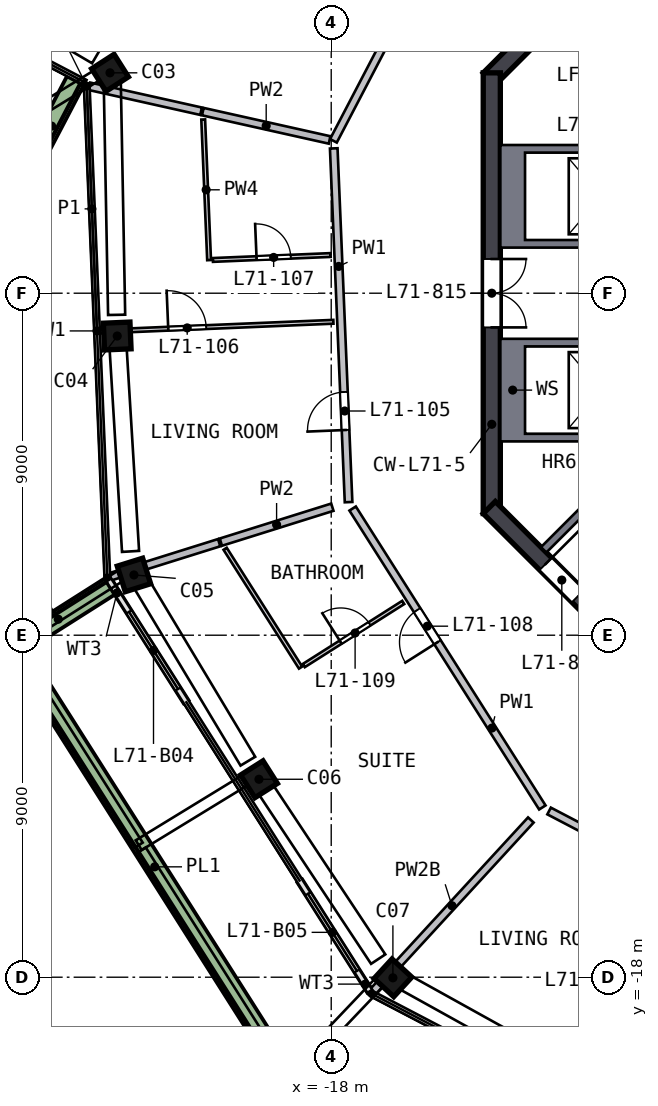
"""IFC4 building model, lengths in metres.
Left out: names, types, materials, properties, quantities, classifications, styles, units other than length and angle.
Written with IfcOpenShell. Run it as: python <this file> out.ifc"""

import sys

from ifc_helpers import new_model, si_unit, direction, frame, frame_2d, origin, origin_2d, place, context, subcontext, project, spatial, polyline, rectangle, outline, extrude, element, fill, save


model = new_model("IFC4")
c1 = context("Model", 3, precision=1e-05, world=origin(), true_north=direction((0.0, 1.0)))
c2 = subcontext(c1, "Body", "Model", "MODEL_VIEW")
j1 = project(units=[si_unit("LENGTHUNIT", "METRE"), si_unit("PLANEANGLEUNIT", "RADIAN")], contexts=[c1])
p1 = place(None, origin())
s1 = spatial("IfcSite", under=j1, at=p1, CompositionType="ELEMENT")
p2 = place(p1, origin())
s2 = spatial("IfcBuilding", under=s1, at=p2, CompositionType="ELEMENT")
p3 = place(p2, frame((0.0, 0.0, 288.0)))
s3 = spatial("IfcBuildingStorey", under=s2, at=p3, CompositionType="ELEMENT", Elevation=288.0)
p4 = place(p3, frame((-23.788, 5.936, 0.0), z_axis=(-0.027288562, -0.113334945, 0.99318202), x_axis=(-0.539731703, 0.837951325, 0.0807915)))
e1 = element("IfcColumn", 1, at=p4, inside=s3, PredefinedType="COLUMN", context=c2, shape_type="SweptSolid", body=[
    extrude(rectangle(XDim=0.7, YDim=0.7, at=origin_2d()), origin(), (0.0, 0.0, 1.0), 3.212),
])
p5 = place(p3, frame((-23.638, -0.991, 0.0), z_axis=(0.005703621, -0.112399349, 0.993646746), x_axis=(0.041934524, -0.992761931, -0.112539968)))
e2 = element("IfcColumn", 2, at=p5, inside=s3, PredefinedType="COLUMN", context=c2, shape_type="SweptSolid", body=[
    extrude(rectangle(XDim=0.7, YDim=0.7, at=origin_2d()), origin(), (0.0, 0.0, 1.0), 3.21),
])
p6 = place(p3, frame((-23.234, -7.281, 0.0), z_axis=(0.035577075, -0.110228117, 0.993269366), x_axis=(-0.297052323, 0.947810585, 0.115823193)))
e3 = element("IfcColumn", 3, at=p6, inside=s3, PredefinedType="COLUMN", context=c2, shape_type="SweptSolid", body=[
    extrude(rectangle(XDim=0.7, YDim=0.7, at=origin_2d()), origin(), (0.0, 0.0, 1.0), 3.212),
])
p7 = place(p3, frame((-19.975, -12.677, 0.0), z_axis=(0.061066808, -0.094528073, 0.993647467), x_axis=(0.532086167, -0.839178467, -0.112533601)))
e4 = element("IfcColumn", 4, at=p7, inside=s3, PredefinedType="COLUMN", context=c2, shape_type="SweptSolid", body=[
    extrude(rectangle(XDim=0.7, YDim=0.7, at=origin_2d()), origin(), (0.0, 0.0, 1.0), 3.21),
])
p8 = place(p3, frame((-16.481, -17.923, 0.0), z_axis=(0.085902454, -0.077616288, 0.993275632), x_axis=(-0.731317306, 0.672140187, 0.115769454)))
e5 = element("IfcColumn", 5, at=p8, inside=s3, PredefinedType="COLUMN", context=c2, shape_type="SweptSolid", body=[
    extrude(rectangle(XDim=0.7, YDim=0.7, at=origin_2d()), origin(), (0.0, 0.0, 1.0), 3.211),
])
p9 = place(p3, frame((-5.64, 13.841, 0.0), z_axis=(0.0, 0.0, 1.0), x_axis=(-0.707106781, -0.707106781, 0.0)))
e6 = element("IfcWall", 6, at=p9, inside=s3, PredefinedType="SHEAR", context=c2, shape_type="SweptSolid", body=[
    extrude(rectangle(XDim=11.598, YDim=0.45, at=frame_2d((5.799, 0.0))), origin(), (0.0, 0.0, 1.0), 3.5),
])
p10 = place(p3, frame((-13.775, 5.799, 0.0), z_axis=(0.0, 0.0, 1.0), x_axis=(0.0, -1.0, 0.0)))
e7 = element("IfcWall", 7, at=p10, inside=s3, PredefinedType="SHEAR", context=c2, shape_type="SweptSolid", body=[
    extrude(rectangle(XDim=11.598, YDim=0.45, at=frame_2d((5.799, 0.0))), origin(), (0.0, 0.0, 1.0), 3.5),
])
p11 = place(p10, frame((4.899, 0.0, 0.0)))
e8 = element("IfcOpeningElement", 8, at=p11, cuts=e7, PredefinedType="OPENING", context=c2, shape_type="SweptSolid", body=[
    extrude(rectangle(XDim=1.8, YDim=2.1, at=frame_2d((0.9, 1.05))), frame((0.0, 0.235, 0.0), z_axis=(0.0, -1.0, 0.0), x_axis=(1.0, 0.0, 0.0)), (0.0, 0.0, 1.0), 0.47),
])
p12 = place(p3, frame((-13.841, -5.64, 0.0), z_axis=(0.0, 0.0, 1.0), x_axis=(0.707106781, -0.707106781, 0.0)))
e9 = element("IfcWall", 9, at=p12, inside=s3, PredefinedType="SHEAR", context=c2, shape_type="SweptSolid", body=[
    extrude(rectangle(XDim=11.598, YDim=0.45, at=frame_2d((5.799, 0.0))), origin(), (0.0, 0.0, 1.0), 3.5),
])
p13 = place(p12, frame((2.099, 0.0, 0.0)))
e10 = element("IfcOpeningElement", 10, at=p13, cuts=e9, PredefinedType="OPENING", context=c2, shape_type="SweptSolid", body=[
    extrude(rectangle(XDim=1.2, YDim=2.1, at=frame_2d((0.6, 1.05))), frame((0.0, 0.235, 0.0), z_axis=(0.0, -1.0, 0.0), x_axis=(1.0, 0.0, 0.0)), (0.0, 0.0, 1.0), 0.47),
])
p14 = place(p3, frame((-23.848, -7.554, 0.0), z_axis=(0.0, 0.0, 1.0), x_axis=(0.535827975, -0.844327176, 0.0)))
e11 = element("IfcWall", 11, at=p14, inside=s3, PredefinedType="SOLIDWALL", context=c2, shape_type="SweptSolid", body=[
    extrude(rectangle(XDim=3.787, YDim=0.15, at=frame_2d((1.894, 0.0))), origin(), (0.0, 0.0, 1.0), 2.525),
])
p15 = place(p14, frame((0.987, 0.0, 0.0)))
e12 = element("IfcOpeningElement", 12, at=p15, cuts=e11, PredefinedType="OPENING", context=c2, shape_type="SweptSolid", body=[
    extrude(rectangle(XDim=2.4, YDim=2.4, at=frame_2d((1.2, 1.2))), frame((0.0, 0.085, 0.0), z_axis=(0.0, -1.0, 0.0), x_axis=(1.0, 0.0, 0.0)), (0.0, 0.0, 1.0), 0.17),
])
p16 = place(p3, frame((-18.826, -15.468, 0.0), z_axis=(0.0, 0.0, 1.0), x_axis=(0.53583323, -0.844323842, 0.0)))
e13 = element("IfcWall", 13, at=p16, inside=s3, PredefinedType="SOLIDWALL", context=c2, shape_type="SweptSolid", body=[
    extrude(rectangle(XDim=3.427, YDim=0.15, at=frame_2d((1.713, 0.0))), origin(), (0.0, 0.0, 1.0), 2.525),
])
p17 = place(p16, frame((0.4, 0.0, 0.0)))
e14 = element("IfcOpeningElement", 14, at=p17, cuts=e13, PredefinedType="OPENING", context=c2, shape_type="SweptSolid", body=[
    extrude(rectangle(XDim=2.4, YDim=2.4, at=frame_2d((1.2, 1.2))), frame((0.0, 0.085, 0.0), z_axis=(0.0, -1.0, 0.0), x_axis=(1.0, 0.0, 0.0)), (0.0, 0.0, 1.0), 0.17),
])
p18 = place(p3, frame((-25.982, 3.202, 0.0), z_axis=(0.0, 0.0, 1.0), x_axis=(0.463313949, 0.886194214, 0.0)))
e15 = element("IfcWall", 15, at=p18, inside=s3, PredefinedType="SOLIDWALL", context=c2, shape_type="SweptSolid", body=[
    extrude(rectangle(XDim=2.699, YDim=0.5, at=frame_2d((1.35, 0.0))), origin(), (0.0, 0.0, 1.0), 0.7),
])
p19 = place(p3, frame((-23.832, -7.722, 0.0), z_axis=(0.0, 0.0, 1.0), x_axis=(-0.844320788, -0.535838042, 0.0)))
e16 = element("IfcWall", 16, at=p19, inside=s3, PredefinedType="SOLIDWALL", context=c2, shape_type="SweptSolid", body=[
    extrude(rectangle(XDim=3.199, YDim=0.5, at=frame_2d((1.6, 0.0))), origin(), (0.0, 0.0, 1.0), 0.7),
])
p20 = place(p3, frame((-26.188, -9.513, 0.0), z_axis=(0.0, 0.0, 1.0), x_axis=(0.535821402, -0.844331348, 0.0)))
e17 = element("IfcWall", 17, at=p20, inside=s3, PredefinedType="SOLIDWALL", context=c2, shape_type="SweptSolid", body=[
    extrude(rectangle(XDim=13.224, YDim=0.5, at=frame_2d((6.612, 0.0))), origin(), (0.0, 0.0, 1.0), 0.7),
])
p21 = place(p3, origin())
e18 = element("IfcWall", 18, at=p21, inside=s3, PredefinedType="SOLIDWALL", context=c2, shape_type="SweptSolid", body=[
    extrude(outline(polyline([(-13.55, 3.9), (-9.9, 3.9), (-9.9, 3.7), (-12.9, 3.7), (-12.9, 1.4), (-9.9, 1.4), (-9.9, 1.2), (-13.55, 1.2), (-13.55, 3.9)])), origin(), (0.0, 0.0, 1.0), 3.19),
])
p22 = place(p3, origin())
e19 = element("IfcWall", 19, at=p22, inside=s3, PredefinedType="SOLIDWALL", context=c2, shape_type="SweptSolid", body=[
    extrude(outline(polyline([(-13.55, -3.9), (-13.55, -1.2), (-9.9, -1.2), (-9.9, -1.4), (-12.9, -1.4), (-12.9, -3.7), (-9.9, -3.7), (-9.9, -3.9), (-13.55, -3.9)])), origin(), (0.0, 0.0, 1.0), 3.19),
])
p23 = place(p3, origin())
e20 = element("IfcWall", 20, at=p23, inside=s3, PredefinedType="SOLIDWALL", context=c2, shape_type="SweptSolid", body=[
    extrude(outline(polyline([(-11.561, 7.601), (-9.652, 9.51), (-9.192, 9.051), (-10.96, 7.283), (-8.874, 5.197), (-9.016, 5.056), (-11.561, 7.601)])), origin(), (0.0, 0.0, 1.0), 3.19),
])
p24 = place(p3, frame((-9.334, -3.677, 0.0), z_axis=(0.0, 0.0, 1.0), x_axis=(-0.707106781, -0.707106781, 0.0)))
e21 = element("IfcWall", 21, at=p24, inside=s3, PredefinedType="SOLIDWALL", context=c2, shape_type="SweptSolid", body=[
    extrude(rectangle(XDim=4.35, YDim=0.2, at=frame_2d((2.175, 0.0))), origin(), (0.0, 0.0, 1.0), 3.19),
])
p25 = place(p3, frame((-17.543, -5.498, 0.0), z_axis=(0.0, 0.0, 1.0), x_axis=(-0.041874694, 0.99912287, 0.0)))
e22 = element("IfcWall", 22, at=p25, inside=s3, PredefinedType="SOLIDWALL", context=c2, shape_type="SweptSolid", body=[
    extrude(rectangle(XDim=9.317, YDim=0.2, at=frame_2d((4.658, 0.0))), origin(), (0.0, 0.0, 1.0), 3.19),
])
p26 = place(p25, frame((1.9, 0.0, 0.0)))
e23 = element("IfcOpeningElement", 23, at=p26, cuts=e22, PredefinedType="OPENING", context=c2, shape_type="SweptSolid", body=[
    extrude(rectangle(XDim=1.0, YDim=2.1, at=frame_2d((0.5, 1.05))), frame((0.0, 0.11, 0.0), z_axis=(0.0, -1.0, 0.0), x_axis=(1.0, 0.0, 0.0)), (0.0, 0.0, 1.0), 0.22),
])
p27 = place(p3, frame((-17.942, 4.01, 0.0), z_axis=(0.0, 0.0, 1.0), x_axis=(0.463289395, 0.88620705, 0.0)))
e24 = element("IfcWall", 24, at=p27, inside=s3, PredefinedType="SOLIDWALL", context=c2, shape_type="SweptSolid", body=[
    extrude(rectangle(XDim=9.537, YDim=0.2, at=frame_2d((4.768, 0.0))), origin(), (0.0, 0.0, 1.0), 3.19),
])
p28 = place(p27, frame((3.837, 0.0, 0.0)))
e25 = element("IfcOpeningElement", 25, at=p28, cuts=e24, PredefinedType="OPENING", context=c2, shape_type="SweptSolid", body=[
    extrude(rectangle(XDim=1.8, YDim=2.1, at=frame_2d((0.9, 1.05))), frame((0.0, 0.11, 0.0), z_axis=(0.0, -1.0, 0.0), x_axis=(1.0, 0.0, 0.0)), (0.0, 0.0, 1.0), 0.22),
])
p29 = place(p3, frame((-12.444, -13.533, 0.0), z_axis=(0.0, 0.0, 1.0), x_axis=(-0.535837373, 0.844321212, 0.0)))
e26 = element("IfcWall", 26, at=p29, inside=s3, PredefinedType="SOLIDWALL", context=c2, shape_type="SweptSolid", body=[
    extrude(rectangle(XDim=9.317, YDim=0.2, at=frame_2d((4.658, 0.0))), origin(), (0.0, 0.0, 1.0), 3.19),
])
p30 = place(p29, frame((5.15, 0.0, 0.0)))
e27 = element("IfcOpeningElement", 27, at=p30, cuts=e26, PredefinedType="OPENING", context=c2, shape_type="SweptSolid", body=[
    extrude(rectangle(XDim=1.0, YDim=2.1, at=frame_2d((0.5, 1.05))), frame((0.0, 0.11, 0.0), z_axis=(0.0, -1.0, 0.0), x_axis=(1.0, 0.0, 0.0)), (0.0, 0.0, 1.0), 0.22),
])
p31 = place(p3, frame((-4.188, -17.849, 0.0), z_axis=(0.0, 0.0, 1.0), x_axis=(-0.886199207, 0.463304399, 0.0)))
e28 = element("IfcWall", 28, at=p31, inside=s3, PredefinedType="SOLIDWALL", context=c2, shape_type="SweptSolid", body=[
    extrude(rectangle(XDim=9.117, YDim=0.2, at=frame_2d((4.559, 0.0))), origin(), (0.0, 0.0, 1.0), 3.19),
])
p32 = place(p31, frame((6.458, 0.0, 0.0)))
e29 = element("IfcOpeningElement", 29, at=p32, cuts=e28, PredefinedType="OPENING", context=c2, shape_type="SweptSolid", body=[
    extrude(rectangle(XDim=1.0, YDim=2.1, at=frame_2d((0.5, 1.05))), frame((0.0, 0.11, 0.0), z_axis=(0.0, -1.0, 0.0), x_axis=(1.0, 0.0, 0.0)), (0.0, 0.0, 1.0), 0.22),
])
p33 = place(p3, frame((-21.424, 4.789, 0.0), z_axis=(0.0, 0.0, 1.0), x_axis=(-0.975909655, 0.218175034, 0.0)))
e30 = element("IfcWall", 30, at=p33, inside=s3, PredefinedType="SOLIDWALL", context=c2, shape_type="SweptSolid", body=[
    extrude(rectangle(XDim=3.011, YDim=0.2, at=frame_2d((1.506, 0.0))), origin(), (0.0, 0.0, 1.0), 2.69),
])
p34 = place(p3, frame((-20.948, -6.565, 0.0), z_axis=(0.0, 0.0, 1.0), x_axis=(-0.954235882, -0.29905498, 0.0)))
e31 = element("IfcWall", 31, at=p34, inside=s3, PredefinedType="SOLIDWALL", context=c2, shape_type="SweptSolid", body=[
    extrude(rectangle(XDim=3.012, YDim=0.2, at=frame_2d((1.506, 0.0))), origin(), (0.0, 0.0, 1.0), 3.19),
])
p35 = place(p3, frame((-18.043, 4.033, 0.0), z_axis=(0.0, 0.0, 1.0), x_axis=(-0.975924202, 0.218109953, 0.0)))
e32 = element("IfcWall", 32, at=p35, inside=s3, PredefinedType="SOLIDWALL", context=c2, shape_type="SweptSolid", body=[
    extrude(rectangle(XDim=3.418, YDim=0.2, at=frame_2d((1.709, 0.0))), origin(), (0.0, 0.0, 1.0), 3.19),
])
p36 = place(p3, frame((-17.97, -5.632, 0.0), z_axis=(0.0, 0.0, 1.0), x_axis=(-0.954245152, -0.299025399, 0.0)))
e33 = element("IfcWall", 33, at=p36, inside=s3, PredefinedType="SOLIDWALL", context=c2, shape_type="SweptSolid", body=[
    extrude(rectangle(XDim=3.075, YDim=0.2, at=frame_2d((1.537, 0.0))), origin(), (0.0, 0.0, 1.0), 3.19),
])
p37 = place(p3, frame((-12.747, -13.862, 0.0), z_axis=(0.0, 0.0, 1.0), x_axis=(-0.676863295, -0.736108742, 0.0)))
e34 = element("IfcWall", 34, at=p37, inside=s3, PredefinedType="SOLIDWALL", context=c2, shape_type="SweptSolid", body=[
    extrude(rectangle(XDim=6.132, YDim=0.2, at=frame_2d((3.066, 0.0))), origin(), (0.0, 0.0, 1.0), 2.69),
])
p38 = place(p3, frame((-21.368, 4.572, 0.0), z_axis=(0.0, 0.0, 1.0), x_axis=(0.041855359, -0.99912368, 0.0)))
e35 = element("IfcWall", 35, at=p38, inside=s3, PredefinedType="PARTITIONING", context=c2, shape_type="SweptSolid", body=[
    extrude(rectangle(XDim=3.704, YDim=0.1, at=frame_2d((1.852, 0.0))), origin(), (0.0, 0.0, 1.0), 3.19),
])
p39 = place(p3, frame((-24.087, -1.01, 0.0), z_axis=(0.0, 0.0, 1.0), x_axis=(0.999122584, 0.041881529, 0.0)))
e36 = element("IfcWall", 36, at=p39, inside=s3, PredefinedType="PARTITIONING", context=c2, shape_type="SweptSolid", body=[
    extrude(rectangle(XDim=6.15, YDim=0.1, at=frame_2d((3.075, 0.0))), origin(), (0.0, 0.0, 1.0), 3.19),
])
p40 = place(p39, frame((1.8, 0.0, 0.0)))
e37 = element("IfcOpeningElement", 37, at=p40, cuts=e36, PredefinedType="OPENING", context=c2, shape_type="SweptSolid", body=[
    extrude(rectangle(XDim=1.0, YDim=2.1, at=frame_2d((0.5, 1.05))), frame((0.0, 0.06, 0.0), z_axis=(0.0, -1.0, 0.0), x_axis=(1.0, 0.0, 0.0)), (0.0, 0.0, 1.0), 0.12),
])
p41 = place(p3, frame((-18.807, -9.853, 0.0), z_axis=(0.0, 0.0, 1.0), x_axis=(-0.535851547, 0.844312217, 0.0)))
e38 = element("IfcWall", 38, at=p41, inside=s3, PredefinedType="PARTITIONING", context=c2, shape_type="SweptSolid", body=[
    extrude(rectangle(XDim=3.704, YDim=0.1, at=frame_2d((1.852, 0.0))), origin(), (0.0, 0.0, 1.0), 3.19),
])
p42 = place(p3, frame((-21.114, 0.875, 0.0), z_axis=(0.0, 0.0, 1.0), x_axis=(0.999121983, 0.041895869, 0.0)))
e39 = element("IfcWall", 39, at=p42, inside=s3, PredefinedType="PARTITIONING", context=c2, shape_type="SweptSolid", body=[
    extrude(rectangle(XDim=3.1, YDim=0.1, at=frame_2d((1.55, 0.0))), origin(), (0.0, 0.0, 1.0), 3.19),
])
p43 = place(p42, frame((1.15, 0.0, 0.0)))
e40 = element("IfcOpeningElement", 40, at=p43, cuts=e39, PredefinedType="OPENING", context=c2, shape_type="SweptSolid", body=[
    extrude(rectangle(XDim=0.9, YDim=2.1, at=frame_2d((0.45, 1.05))), frame((0.0, 0.06, 0.0), z_axis=(0.0, -1.0, 0.0), x_axis=(1.0, 0.0, 0.0)), (0.0, 0.0, 1.0), 0.12),
])
p44 = place(p3, frame((-18.722, -9.799, 0.0), z_axis=(0.0, 0.0, 1.0), x_axis=(0.844319142, 0.535840635, 0.0)))
e41 = element("IfcWall", 41, at=p44, inside=s3, PredefinedType="PARTITIONING", context=c2, shape_type="SweptSolid", body=[
    extrude(rectangle(XDim=3.1, YDim=0.1, at=frame_2d((1.55, 0.0))), origin(), (0.0, 0.0, 1.0), 3.19),
])
p45 = place(p44, frame((1.15, 0.0, 0.0)))
e42 = element("IfcOpeningElement", 42, at=p45, cuts=e41, PredefinedType="OPENING", context=c2, shape_type="SweptSolid", body=[
    extrude(rectangle(XDim=0.9, YDim=2.1, at=frame_2d((0.45, 1.05))), frame((0.0, 0.06, 0.0), z_axis=(0.0, -1.0, 0.0), x_axis=(1.0, 0.0, 0.0)), (0.0, 0.0, 1.0), 0.12),
])
p46 = place(p15, origin())
e43 = element("IfcDoor", 43, at=p46, inside=s3, OperationType="SLIDING_TO_LEFT", PredefinedType="DOOR", context=c2, shape_type="SweptSolid", body=[
    extrude(rectangle(XDim=2.4, YDim=2.4, at=frame_2d((1.2, 1.2))), frame((0.0, 0.025, 0.0), z_axis=(0.0, -1.0, 0.0), x_axis=(1.0, 0.0, 0.0)), (0.0, 0.0, 1.0), 0.05),
])
fill(e12, e43)
p47 = place(p17, origin())
e44 = element("IfcDoor", 44, at=p47, inside=s3, OperationType="SLIDING_TO_RIGHT", PredefinedType="DOOR", context=c2, shape_type="SweptSolid", body=[
    extrude(rectangle(XDim=2.4, YDim=2.4, at=frame_2d((1.2, 1.2))), frame((0.0, 0.025, 0.0), z_axis=(0.0, -1.0, 0.0), x_axis=(1.0, 0.0, 0.0)), (0.0, 0.0, 1.0), 0.05),
])
fill(e14, e44)
p48 = place(p11, origin())
e45 = element("IfcDoor", 45, at=p48, inside=s3, OperationType="DOUBLE_DOOR_SINGLE_SWING", PredefinedType="DOOR", context=c2, shape_type="SweptSolid", body=[
    extrude(rectangle(XDim=1.8, YDim=2.1, at=frame_2d((0.9, 1.05))), frame((0.0, 0.025, 0.0), z_axis=(0.0, -1.0, 0.0), x_axis=(1.0, 0.0, 0.0)), (0.0, 0.0, 1.0), 0.05),
])
fill(e8, e45)
p49 = place(p13, origin())
e46 = element("IfcDoor", 46, at=p49, inside=s3, OperationType="SINGLE_SWING_LEFT", PredefinedType="DOOR", context=c2, shape_type="SweptSolid", body=[
    extrude(rectangle(XDim=1.2, YDim=2.1, at=frame_2d((0.6, 1.05))), frame((0.0, 0.025, 0.0), z_axis=(0.0, -1.0, 0.0), x_axis=(1.0, 0.0, 0.0)), (0.0, 0.0, 1.0), 0.05),
])
fill(e10, e46)
p50 = place(p26, origin())
e47 = element("IfcDoor", 47, at=p50, inside=s3, OperationType="SINGLE_SWING_LEFT", PredefinedType="DOOR", context=c2, shape_type="SweptSolid", body=[
    extrude(rectangle(XDim=1.0, YDim=2.1, at=frame_2d((0.5, 1.05))), frame((0.0, 0.025, 0.0), z_axis=(0.0, -1.0, 0.0), x_axis=(1.0, 0.0, 0.0)), (0.0, 0.0, 1.0), 0.05),
])
fill(e23, e47)
p51 = place(p40, origin())
e48 = element("IfcDoor", 48, at=p51, inside=s3, OperationType="SINGLE_SWING_LEFT", PredefinedType="DOOR", context=c2, shape_type="SweptSolid", body=[
    extrude(rectangle(XDim=1.0, YDim=2.1, at=frame_2d((0.5, 1.05))), frame((0.0, 0.025, 0.0), z_axis=(0.0, -1.0, 0.0), x_axis=(1.0, 0.0, 0.0)), (0.0, 0.0, 1.0), 0.05),
])
fill(e37, e48)
p52 = place(p43, origin())
e49 = element("IfcDoor", 49, at=p52, inside=s3, OperationType="SINGLE_SWING_LEFT", PredefinedType="DOOR", context=c2, shape_type="SweptSolid", body=[
    extrude(rectangle(XDim=0.9, YDim=2.1, at=frame_2d((0.45, 1.05))), frame((0.0, 0.025, 0.0), z_axis=(0.0, -1.0, 0.0), x_axis=(1.0, 0.0, 0.0)), (0.0, 0.0, 1.0), 0.05),
])
fill(e40, e49)
p53 = place(p30, origin())
e50 = element("IfcDoor", 50, at=p53, inside=s3, OperationType="SINGLE_SWING_LEFT", PredefinedType="DOOR", context=c2, shape_type="SweptSolid", body=[
    extrude(rectangle(XDim=1.0, YDim=2.1, at=frame_2d((0.5, 1.05))), frame((0.0, 0.025, 0.0), z_axis=(0.0, -1.0, 0.0), x_axis=(1.0, 0.0, 0.0)), (0.0, 0.0, 1.0), 0.05),
])
fill(e27, e50)
p54 = place(p45, origin())
e51 = element("IfcDoor", 51, at=p54, inside=s3, OperationType="SINGLE_SWING_LEFT", PredefinedType="DOOR", context=c2, shape_type="SweptSolid", body=[
    extrude(rectangle(XDim=0.9, YDim=2.1, at=frame_2d((0.45, 1.05))), frame((0.0, 0.025, 0.0), z_axis=(0.0, -1.0, 0.0), x_axis=(1.0, 0.0, 0.0)), (0.0, 0.0, 1.0), 0.05),
])
fill(e42, e51)
save(model, sys.argv[1])
